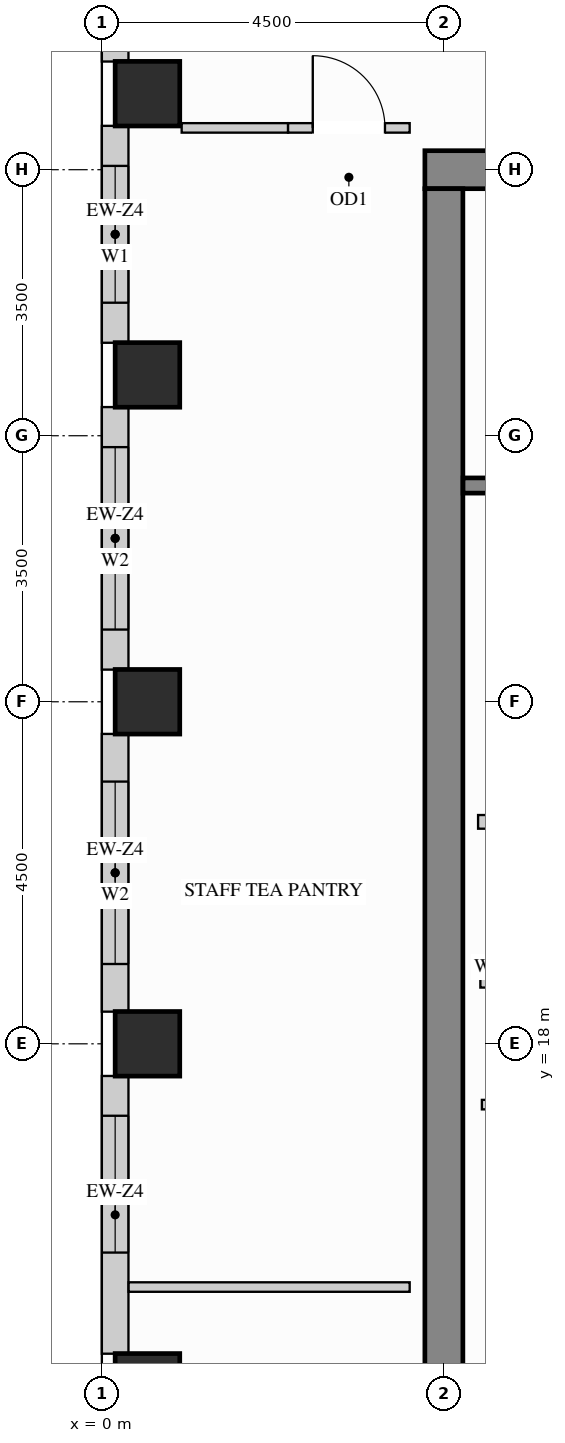
"""IFC4 building model, lengths in metres.
Left out: names, types, materials, properties, quantities, classifications, styles, units other than length and angle.
Written with IfcOpenShell. Run it as: python <this file> out.ifc"""

import sys

from ifc_helpers import new_model, si_unit, direction, frame, frame_2d, origin, origin_2d, place, context, subcontext, project, spatial, rectangle, extrude, source, transform, mapped, element, fill, save


model = new_model("IFC4")
c1 = context("Model", 3, precision=1e-05, world=origin(), true_north=direction((0.0, 1.0)))
c2 = subcontext(c1, "Body", "Model", "MODEL_VIEW")
j1 = project(units=[si_unit("LENGTHUNIT", "METRE"), si_unit("PLANEANGLEUNIT", "RADIAN")], contexts=[c1])
p1 = place(None, origin())
s1 = spatial("IfcSite", under=j1, at=p1, CompositionType="ELEMENT")
p2 = place(p1, origin())
s2 = spatial("IfcBuilding", under=s1, at=p2, CompositionType="ELEMENT")
p3 = place(p2, frame((0.0, 0.0, 219.6)))
s3 = spatial("IfcBuildingStorey", under=s2, at=p3, CompositionType="ELEMENT", Elevation=219.6)
m1 = source(origin(), c2, "Body", "SweptSolid", [
    extrude(rectangle(XDim=0.85, YDim=0.85, at=origin_2d()), origin(), (0.0, 0.0, 1.0), 3.4),
])
for number, where, z_axis, x_axis in (
    (1, (0.6, 13.5, 0.0), (0.0, 0.0, 1.0), (1.0, 0.0, 0.0)),
    (2, (0.6, 18.0, 0.0), (0.0, 0.0, 1.0), (1.0, 0.0, 0.0)),
    (3, (0.6, 22.5, 0.0), (0.0, 0.0, 1.0), (1.0, 0.0, 0.0)),
    (4, (0.6, 26.8, 0.0), (0.0, 0.0, 1.0), (1.0, 0.0, 0.0)),
    (5, (0.6, 30.5, 0.0), (0.0, 0.0, 1.0), (1.0, 0.0, 0.0)),
):
    element("IfcColumn", number, at=place(p3, frame(where, z_axis=z_axis, x_axis=x_axis)), inside=s3, PredefinedType="COLUMN", context=c2, shape_type="MappedRepresentation", body=[
        mapped(m1, transform((0.0, 0.0, 0.0), x_axis=(1.0, 0.0, 0.0), y_axis=(0.0, 1.0, 0.0), z_axis=(0.0, 0.0, 1.0))),
    ])
m2 = source(origin(), c2, "Body", "SweptSolid", [
    extrude(rectangle(XDim=10.5, YDim=0.5, at=frame_2d((5.25, 0.0))), origin(), (0.0, 0.0, 1.0), 3.4),
])
p4 = place(p3, frame((4.25, 29.5, 0.0), z_axis=(0.0, 0.0, 1.0), x_axis=(1.0, 0.0, 0.0)))
e6 = element("IfcWall", 6, at=p4, inside=s3, PredefinedType="SHEAR", context=c2, shape_type="MappedRepresentation", body=[
    mapped(m2, transform((0.0, 0.0, 0.0), x_axis=(1.0, 0.0, 0.0), y_axis=(0.0, 1.0, 0.0), z_axis=(0.0, 0.0, 1.0))),
])
m3 = source(origin(), c2, "Body", "SweptSolid", [
    extrude(rectangle(XDim=20.5, YDim=0.5, at=frame_2d((10.25, 0.0))), origin(), (0.0, 0.0, 1.0), 3.4),
])
p5 = place(p3, frame((4.5, 8.75, 0.0), z_axis=(0.0, 0.0, 1.0), x_axis=(0.0, 1.0, 0.0)))
e7 = element("IfcWall", 7, at=p5, inside=s3, PredefinedType="SHEAR", context=c2, shape_type="MappedRepresentation", body=[
    mapped(m3, transform((0.0, 0.0, 0.0), x_axis=(1.0, 0.0, 0.0), y_axis=(0.0, 1.0, 0.0), z_axis=(0.0, 0.0, 1.0))),
])
p6 = place(p3, frame((0.175, 34.577, 0.0), z_axis=(0.0, 0.0, 1.0), x_axis=(0.0, -1.0, 0.0)))
e8 = element("IfcWall", 8, at=p6, inside=s3, PredefinedType="SOLIDWALL", context=c2, shape_type="SweptSolid", body=[
    extrude(rectangle(XDim=3.654, YDim=0.35, at=frame_2d((1.827, 0.0))), origin(), (0.0, 0.0, 1.0), 3.385),
])
p7 = place(p6, frame((0.648, 0.0, 0.78)))
e9 = element("IfcOpeningElement", 9, at=p7, cuts=e8, PredefinedType="OPENING", context=c2, shape_type="SweptSolid", body=[
    extrude(rectangle(XDim=1.8, YDim=2.1, at=frame_2d((0.9, 1.05))), frame((0.0, 0.185, 0.0), z_axis=(0.0, -1.0, 0.0), x_axis=(1.0, 0.0, 0.0)), (0.0, 0.0, 1.0), 0.37),
])
p8 = place(p3, frame((0.175, 30.077, 0.0), z_axis=(0.0, 0.0, 1.0), x_axis=(0.0, -1.0, 0.0)))
e10 = element("IfcWall", 10, at=p8, inside=s3, PredefinedType="SOLIDWALL", context=c2, shape_type="SweptSolid", body=[
    extrude(rectangle(XDim=2.854, YDim=0.35, at=frame_2d((1.427, 0.0))), origin(), (0.0, 0.0, 1.0), 3.385),
])
p9 = place(p8, frame((0.527, 0.0, 0.78)))
e11 = element("IfcOpeningElement", 11, at=p9, cuts=e10, PredefinedType="OPENING", context=c2, shape_type="SweptSolid", body=[
    extrude(rectangle(XDim=1.8, YDim=2.1, at=frame_2d((0.9, 1.05))), frame((0.0, 0.185, 0.0), z_axis=(0.0, -1.0, 0.0), x_axis=(1.0, 0.0, 0.0)), (0.0, 0.0, 1.0), 0.37),
])
p10 = place(p3, frame((0.175, 26.377, 0.0), z_axis=(0.0, 0.0, 1.0), x_axis=(0.0, -1.0, 0.0)))
e12 = element("IfcWall", 12, at=p10, inside=s3, PredefinedType="SOLIDWALL", context=c2, shape_type="SweptSolid", body=[
    extrude(rectangle(XDim=3.454, YDim=0.35, at=frame_2d((1.727, 0.0))), origin(), (0.0, 0.0, 1.0), 3.385),
])
p11 = place(p10, frame((0.527, 0.0, 0.78)))
e13 = element("IfcOpeningElement", 13, at=p11, cuts=e12, PredefinedType="OPENING", context=c2, shape_type="SweptSolid", body=[
    extrude(rectangle(XDim=2.4, YDim=2.1, at=frame_2d((1.2, 1.05))), frame((0.0, 0.185, 0.0), z_axis=(0.0, -1.0, 0.0), x_axis=(1.0, 0.0, 0.0)), (0.0, 0.0, 1.0), 0.37),
])
p12 = place(p3, frame((0.175, 22.077, 0.0), z_axis=(0.0, 0.0, 1.0), x_axis=(0.0, -1.0, 0.0)))
e14 = element("IfcWall", 14, at=p12, inside=s3, PredefinedType="SOLIDWALL", context=c2, shape_type="SweptSolid", body=[
    extrude(rectangle(XDim=3.654, YDim=0.35, at=frame_2d((1.827, 0.0))), origin(), (0.0, 0.0, 1.0), 3.385),
])
p13 = place(p12, frame((0.627, 0.0, 0.78)))
e15 = element("IfcOpeningElement", 15, at=p13, cuts=e14, PredefinedType="OPENING", context=c2, shape_type="SweptSolid", body=[
    extrude(rectangle(XDim=2.4, YDim=2.1, at=frame_2d((1.2, 1.05))), frame((0.0, 0.185, 0.0), z_axis=(0.0, -1.0, 0.0), x_axis=(1.0, 0.0, 0.0)), (0.0, 0.0, 1.0), 0.37),
])
p14 = place(p3, frame((0.175, 17.577, 0.0), z_axis=(0.0, 0.0, 1.0), x_axis=(0.0, -1.0, 0.0)))
e16 = element("IfcWall", 16, at=p14, inside=s3, PredefinedType="SOLIDWALL", context=c2, shape_type="SweptSolid", body=[
    extrude(rectangle(XDim=3.654, YDim=0.35, at=frame_2d((1.827, 0.0))), origin(), (0.0, 0.0, 1.0), 3.385),
])
p15 = place(p14, frame((0.523, 0.0, 0.78)))
e17 = element("IfcOpeningElement", 17, at=p15, cuts=e16, PredefinedType="OPENING", context=c2, shape_type="SweptSolid", body=[
    extrude(rectangle(XDim=1.8, YDim=2.1, at=frame_2d((0.9, 1.05))), frame((0.0, 0.185, 0.0), z_axis=(0.0, -1.0, 0.0), x_axis=(1.0, 0.0, 0.0)), (0.0, 0.0, 1.0), 0.37),
])
m4 = source(origin(), c2, "Body", "SweptSolid", [
    extrude(rectangle(XDim=2.2, YDim=0.18, at=frame_2d((1.1, 0.0))), origin(), (0.0, 0.0, 1.0), 3.385),
])
p16 = place(p3, frame((4.95, 20.92, 0.0), z_axis=(0.0, 0.0, 1.0), x_axis=(1.0, 0.0, 0.0)))
e18 = element("IfcWall", 18, at=p16, inside=s3, PredefinedType="PARTITIONING", context=c2, shape_type="MappedRepresentation", body=[
    mapped(m4, transform((0.0, 0.0, 0.0), x_axis=(1.0, 0.0, 0.0), y_axis=(0.0, 1.0, 0.0), z_axis=(0.0, 0.0, 1.0))),
])
p17 = place(p3, frame((5.0, 17.2, 0.0), z_axis=(0.0, 0.0, 1.0), x_axis=(1.0, 0.0, 0.0)))
e19 = element("IfcWall", 19, at=p17, inside=s3, PredefinedType="PARTITIONING", context=c2, shape_type="SweptSolid", body=[
    extrude(rectangle(XDim=2.4, YDim=0.125, at=frame_2d((1.2, 0.0))), origin(), (0.0, 0.0, 1.0), 3.385),
])
p18 = place(p17, frame((0.7, 0.0, 0.0)))
e20 = element("IfcOpeningElement", 20, at=p18, cuts=e19, PredefinedType="OPENING", context=c2, shape_type="SweptSolid", body=[
    extrude(rectangle(XDim=0.85, YDim=2.1, at=frame_2d((0.425, 1.05))), frame((0.0, 0.073, 0.0), z_axis=(0.0, -1.0, 0.0), x_axis=(1.0, 0.0, 0.0)), (0.0, 0.0, 1.0), 0.145),
])
m5 = source(origin(), c2, "Body", "SweptSolid", [
    extrude(rectangle(XDim=1.4, YDim=0.125, at=frame_2d((0.7, 0.0))), origin(), (0.0, 0.0, 1.0), 3.385),
])
p19 = place(p3, frame((1.05, 30.05, 0.0), z_axis=(0.0, 0.0, 1.0), x_axis=(1.0, 0.0, 0.0)))
e21 = element("IfcWall", 21, at=p19, inside=s3, PredefinedType="PARTITIONING", context=c2, shape_type="MappedRepresentation", body=[
    mapped(m5, transform((0.0, 0.0, 0.0), x_axis=(1.0, 0.0, 0.0), y_axis=(0.0, 1.0, 0.0), z_axis=(0.0, 0.0, 1.0))),
])
p20 = place(p3, frame((2.45, 30.05, 0.0), z_axis=(0.0, 0.0, 1.0), x_axis=(1.0, 0.0, 0.0)))
e22 = element("IfcWall", 22, at=p20, inside=s3, PredefinedType="PARTITIONING", context=c2, shape_type="SweptSolid", body=[
    extrude(rectangle(XDim=1.6, YDim=0.125, at=frame_2d((0.8, 0.0))), origin(), (0.0, 0.0, 1.0), 3.385),
])
p21 = place(p20, frame((0.325, 0.0, 0.0)))
e23 = element("IfcOpeningElement", 23, at=p21, cuts=e22, PredefinedType="OPENING", context=c2, shape_type="SweptSolid", body=[
    extrude(rectangle(XDim=0.95, YDim=2.15, at=frame_2d((0.475, 1.075))), frame((0.0, 0.073, 0.0), z_axis=(0.0, -1.0, 0.0), x_axis=(1.0, 0.0, 0.0)), (0.0, 0.0, 1.0), 0.145),
])
m6 = source(origin(), c2, "Body", "SweptSolid", [
    extrude(rectangle(XDim=3.698, YDim=0.125, at=frame_2d((1.849, 0.0))), origin(), (0.0, 0.0, 1.0), 3.385),
])
p22 = place(p3, frame((0.352, 14.8, 0.0), z_axis=(0.0, 0.0, 1.0), x_axis=(1.0, 0.0, 0.0)))
e24 = element("IfcWall", 24, at=p22, inside=s3, PredefinedType="PARTITIONING", context=c2, shape_type="MappedRepresentation", body=[
    mapped(m6, transform((0.0, 0.0, 0.0), x_axis=(1.0, 0.0, 0.0), y_axis=(0.0, 1.0, 0.0), z_axis=(0.0, 0.0, 1.0))),
])
m7 = source(origin(), c2, "Body", "SweptSolid", [
    extrude(rectangle(XDim=2.09, YDim=0.2, at=frame_2d((1.045, 0.0))), origin(), (0.0, 0.0, 1.0), 3.385),
])
p23 = place(p3, frame((4.98, 18.84, 0.0), z_axis=(0.0, 0.0, 1.0), x_axis=(1.0, 0.0, 0.0)))
e25 = element("IfcWall", 25, at=p23, inside=s3, PredefinedType="PARTITIONING", context=c2, shape_type="MappedRepresentation", body=[
    mapped(m7, transform((0.0, 0.0, 0.0), x_axis=(1.0, 0.0, 0.0), y_axis=(0.0, 1.0, 0.0), z_axis=(0.0, 0.0, 1.0))),
])
p24 = place(p3, frame((4.752, 25.345, 0.0), z_axis=(0.0, 0.0, 1.0), x_axis=(1.0, 0.0, 0.0)))
e26 = element("IfcWall", 26, at=p24, inside=s3, PredefinedType="SHEAR", context=c2, shape_type="SweptSolid", body=[
    extrude(rectangle(XDim=7.653, YDim=0.2, at=frame_2d((3.827, 0.0))), origin(), (0.0, 0.0, 1.0), 3.4),
])
p25 = place(p24, frame((0.4, 0.0, 0.0)))
e27 = element("IfcOpeningElement", 27, at=p25, cuts=e26, PredefinedType="OPENING", context=c2, shape_type="SweptSolid", body=[
    extrude(rectangle(XDim=1.1, YDim=2.15, at=frame_2d((0.55, 1.075))), frame((0.0, 0.11, 0.0), z_axis=(0.0, -1.0, 0.0), x_axis=(1.0, 0.0, 0.0)), (0.0, 0.0, 1.0), 0.22),
])
m8 = source(origin(), c2, "Body", "SweptSolid", [
    extrude(rectangle(XDim=0.95, YDim=2.15, at=frame_2d((0.475, 1.075))), frame((0.0, 0.025, 0.0), z_axis=(0.0, -1.0, 0.0), x_axis=(1.0, 0.0, 0.0)), (0.0, 0.0, 1.0), 0.05),
])
p26 = place(p21, origin())
e28 = element("IfcDoor", 28, at=p26, inside=s3, OperationType="SINGLE_SWING_LEFT", PredefinedType="DOOR", context=c2, shape_type="MappedRepresentation", body=[
    mapped(m8, transform((0.0, 0.0, 0.0), x_axis=(1.0, 0.0, 0.0), y_axis=(0.0, 1.0, 0.0), z_axis=(0.0, 0.0, 1.0))),
])
fill(e23, e28)
m9 = source(origin(), c2, "Body", "SweptSolid", [
    extrude(rectangle(XDim=1.8, YDim=2.1, at=frame_2d((0.9, 1.05))), frame((0.0, 0.03, 0.0), z_axis=(0.0, -1.0, 0.0), x_axis=(1.0, 0.0, 0.0)), (0.0, 0.0, 1.0), 0.06),
])
p27 = place(p9, origin())
e29 = element("IfcWindow", 29, at=p27, inside=s3, PartitioningType="SINGLE_PANEL", PredefinedType="WINDOW", context=c2, shape_type="MappedRepresentation", body=[
    mapped(m9, transform((0.0, 0.0, 0.0), x_axis=(1.0, 0.0, 0.0), y_axis=(0.0, 1.0, 0.0), z_axis=(0.0, 0.0, 1.0))),
])
fill(e11, e29)
p28 = place(p15, origin())
e30 = element("IfcWindow", 30, at=p28, inside=s3, PartitioningType="SINGLE_PANEL", PredefinedType="WINDOW", context=c2, shape_type="MappedRepresentation", body=[
    mapped(m9, transform((0.0, 0.0, 0.0), x_axis=(1.0, 0.0, 0.0), y_axis=(0.0, 1.0, 0.0), z_axis=(0.0, 0.0, 1.0))),
])
fill(e17, e30)
m10 = source(origin(), c2, "Body", "SweptSolid", [
    extrude(rectangle(XDim=2.4, YDim=2.1, at=frame_2d((1.2, 1.05))), frame((0.0, 0.03, 0.0), z_axis=(0.0, -1.0, 0.0), x_axis=(1.0, 0.0, 0.0)), (0.0, 0.0, 1.0), 0.06),
])
p29 = place(p11, origin())
e31 = element("IfcWindow", 31, at=p29, inside=s3, PartitioningType="SINGLE_PANEL", PredefinedType="WINDOW", context=c2, shape_type="MappedRepresentation", body=[
    mapped(m10, transform((0.0, 0.0, 0.0), x_axis=(1.0, 0.0, 0.0), y_axis=(0.0, 1.0, 0.0), z_axis=(0.0, 0.0, 1.0))),
])
fill(e13, e31)
p30 = place(p13, origin())
e32 = element("IfcWindow", 32, at=p30, inside=s3, PartitioningType="SINGLE_PANEL", PredefinedType="WINDOW", context=c2, shape_type="MappedRepresentation", body=[
    mapped(m10, transform((0.0, 0.0, 0.0), x_axis=(1.0, 0.0, 0.0), y_axis=(0.0, 1.0, 0.0), z_axis=(0.0, 0.0, 1.0))),
])
fill(e15, e32)
save(model, sys.argv[1])
